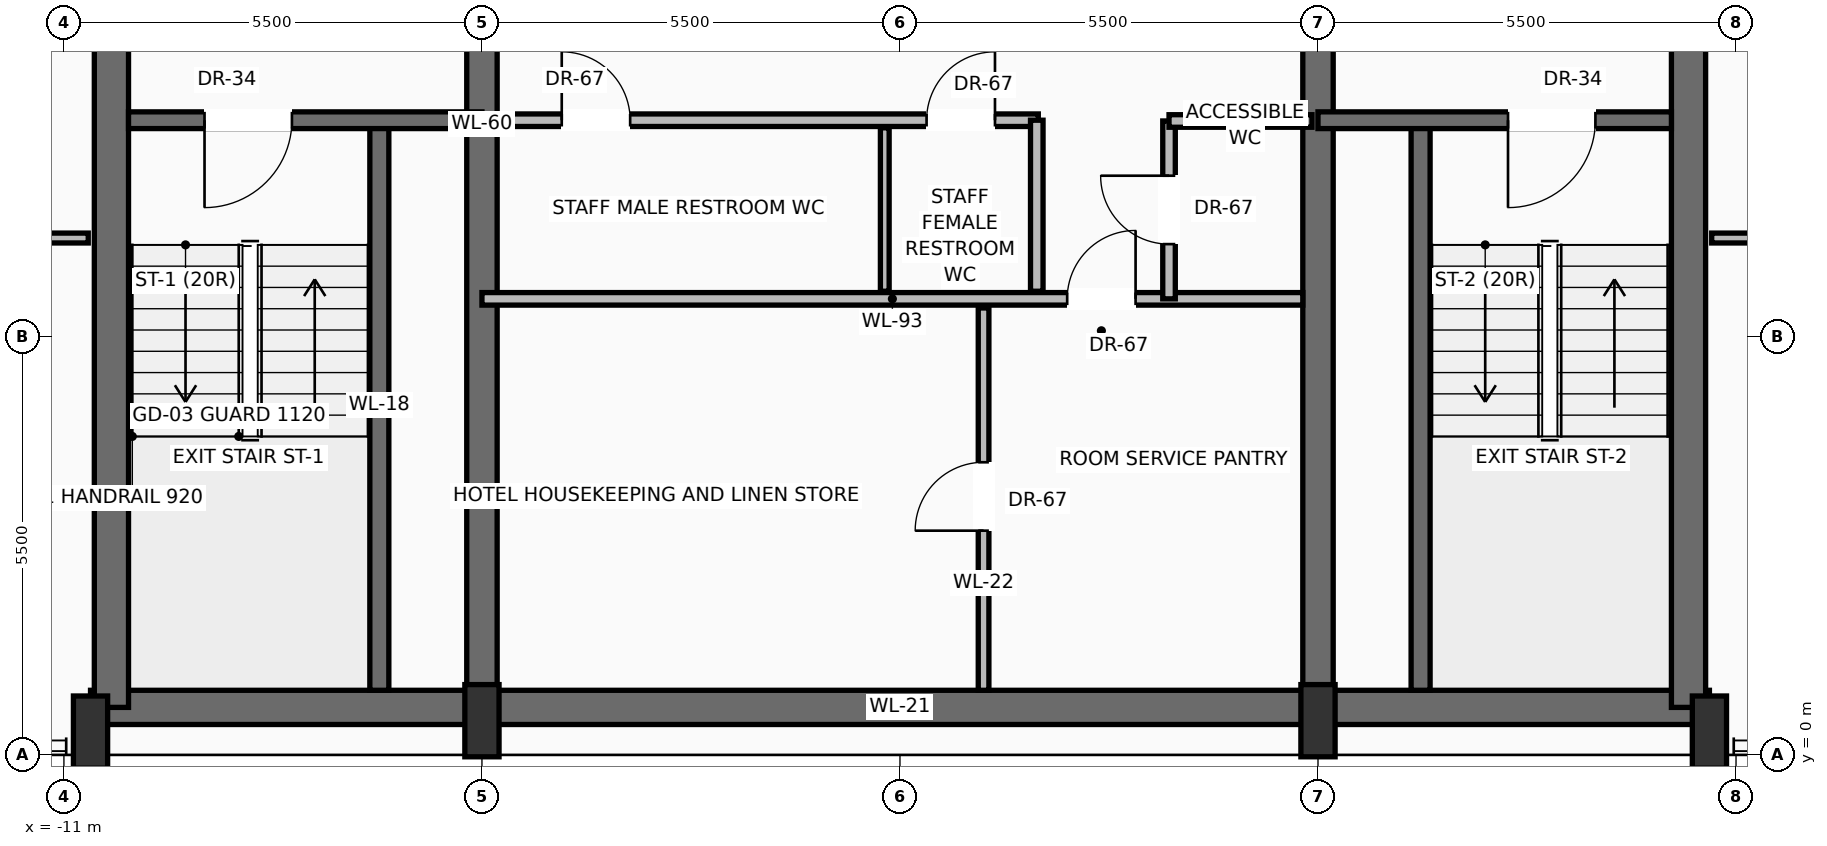
"""IFC4 building model, lengths in metres.
Left out: names, types, materials, properties, quantities, classifications, styles, units other than length and angle.
Written with IfcOpenShell. Run it as: python <this file> out.ifc"""

import sys

from ifc_helpers import new_model, si_unit, direction, frame, frame_2d, origin, origin_2d, place, context, subcontext, project, spatial, rectangle, extrude, source, transform, mapped, element, fill, save


model = new_model("IFC4")
c1 = context("Model", 3, precision=1e-05, world=origin(), true_north=direction((0.0, 1.0)))
c2 = subcontext(c1, "Body", "Model", "MODEL_VIEW")
j1 = project(units=[si_unit("LENGTHUNIT", "METRE"), si_unit("PLANEANGLEUNIT", "RADIAN")], contexts=[c1])
p1 = place(None, origin())
s1 = spatial("IfcSite", under=j1, at=p1, CompositionType="ELEMENT")
p2 = place(p1, origin())
s2 = spatial("IfcBuilding", under=s1, at=p2, CompositionType="ELEMENT")
p3 = place(p2, frame((0.0, 0.0, 293.7)))
s3 = spatial("IfcBuildingStorey", under=s2, at=p3, CompositionType="ELEMENT", Elevation=293.7)
p4 = place(p3, frame((-10.65, 0.625, 0.0), z_axis=(0.0, 0.0, 1.0), x_axis=(1.0, 0.0, 0.0)))
e1 = element("IfcWall", 1, at=p4, inside=s3, PredefinedType="SHEAR", context=c2, shape_type="SweptSolid", body=[
    extrude(rectangle(XDim=21.3, YDim=0.45, at=frame_2d((10.65, 0.0))), origin(), (0.0, 0.0, 1.0), 3.24),
])
for number, where, z_axis, x_axis in (
    (2, (-10.375, 0.625, 0.0), (0.0, 0.0, 1.0), (0.0, 1.0, 0.0)),
    (3, (10.375, 0.625, 0.0), (0.0, 0.0, 1.0), (0.0, 1.0, 0.0)),
):
    element("IfcWall", number, at=place(p3, frame(where, z_axis=z_axis, x_axis=x_axis)), inside=s3, PredefinedType="SHEAR", context=c2, shape_type="SweptSolid", body=[
        extrude(rectangle(XDim=15.35, YDim=0.45, at=frame_2d((7.675, 0.0))), origin(), (0.0, 0.0, 1.0), 3.24),
    ])
p5 = place(p3, frame((-5.5, 0.625, 0.0), z_axis=(0.0, 0.0, 1.0), x_axis=(0.0, 1.0, 0.0)))
e4 = element("IfcWall", 4, at=p5, inside=s3, PredefinedType="SHEAR", context=c2, shape_type="SweptSolid", body=[
    extrude(rectangle(XDim=15.35, YDim=0.4, at=frame_2d((7.675, 0.0))), origin(), (0.0, 0.0, 1.0), 3.24),
])
p6 = place(p5, frame((8.875, 0.0, 0.0)))
e5 = element("IfcOpeningElement", 5, at=p6, cuts=e4, PredefinedType="OPENING", context=c2, shape_type="SweptSolid", body=[
    extrude(rectangle(XDim=1.1, YDim=2.2, at=frame_2d((0.55, 1.1))), frame((0.0, 0.21, 0.0), z_axis=(0.0, -1.0, 0.0), x_axis=(1.0, 0.0, 0.0)), (0.0, 0.0, 1.0), 0.42),
])
p7 = place(p3, frame((5.5, 0.625, 0.0), z_axis=(0.0, 0.0, 1.0), x_axis=(0.0, 1.0, 0.0)))
e6 = element("IfcWall", 6, at=p7, inside=s3, PredefinedType="SHEAR", context=c2, shape_type="SweptSolid", body=[
    extrude(rectangle(XDim=15.35, YDim=0.4, at=frame_2d((7.675, 0.0))), origin(), (0.0, 0.0, 1.0), 3.24),
])
p8 = place(p7, frame((8.875, 0.0, 0.0)))
e7 = element("IfcOpeningElement", 7, at=p8, cuts=e6, PredefinedType="OPENING", context=c2, shape_type="SweptSolid", body=[
    extrude(rectangle(XDim=1.1, YDim=2.2, at=frame_2d((0.55, 1.1))), frame((0.0, 0.21, 0.0), z_axis=(0.0, -1.0, 0.0), x_axis=(1.0, 0.0, 0.0)), (0.0, 0.0, 1.0), 0.42),
])
m1 = source(origin(), c2, "Body", "SweptSolid", [
    extrude(rectangle(XDim=0.45, YDim=0.95, at=origin_2d()), origin(), (0.0, 0.0, 1.0), 3.45),
])
for number, where, z_axis, x_axis in (
    (8, (-10.65, 0.3, 0.0), (0.0, 0.0, 1.0), (1.0, 0.0, 0.0)),
    (9, (-5.5, 0.45, 0.0), (0.0, 0.0, 1.0), (1.0, 0.0, 0.0)),
    (10, (5.5, 0.45, 0.0), (0.0, 0.0, 1.0), (1.0, 0.0, 0.0)),
    (11, (10.65, 0.3, 0.0), (0.0, 0.0, 1.0), (1.0, 0.0, 0.0)),
):
    element("IfcColumn", number, at=place(p3, frame(where, z_axis=z_axis, x_axis=x_axis)), inside=s3, PredefinedType="PILASTER", context=c2, shape_type="MappedRepresentation", body=[
        mapped(m1, transform((0.0, 0.0, 0.0), scale=1.0)),
    ])
p9 = place(p3, frame((-6.85, 0.85, 0.0), z_axis=(0.0, 0.0, 1.0), x_axis=(0.0, 1.0, 0.0)))
e12 = element("IfcWall", 12, at=p9, inside=s3, PredefinedType="SOLIDWALL", context=c2, shape_type="SweptSolid", body=[
    extrude(rectangle(XDim=7.5, YDim=0.25, at=frame_2d((3.75, 0.0))), origin(), (0.0, 0.0, 1.0), 3.24),
])
p10 = place(p3, frame((-5.5, 8.35, 0.0), z_axis=(0.0, 0.0, 1.0), x_axis=(-1.0, 0.0, 0.0)))
e13 = element("IfcWall", 13, at=p10, inside=s3, PredefinedType="SOLIDWALL", context=c2, shape_type="SweptSolid", body=[
    extrude(rectangle(XDim=4.65, YDim=0.22, at=frame_2d((2.325, 0.0))), origin(), (0.0, 0.0, 1.0), 3.24),
])
p11 = place(p10, frame((2.5, 0.0, 0.0)))
e14 = element("IfcOpeningElement", 14, at=p11, cuts=e13, PredefinedType="OPENING", context=c2, shape_type="SweptSolid", body=[
    extrude(rectangle(XDim=1.15, YDim=2.2, at=frame_2d((0.575, 1.1))), frame((0.0, 0.12, 0.0), z_axis=(0.0, -1.0, 0.0), x_axis=(1.0, 0.0, 0.0)), (0.0, 0.0, 1.0), 0.24),
])
p12 = place(p3, frame((6.85, 0.85, 0.0), z_axis=(0.0, 0.0, 1.0), x_axis=(0.0, 1.0, 0.0)))
e15 = element("IfcWall", 15, at=p12, inside=s3, PredefinedType="SOLIDWALL", context=c2, shape_type="SweptSolid", body=[
    extrude(rectangle(XDim=7.5, YDim=0.25, at=frame_2d((3.75, 0.0))), origin(), (0.0, 0.0, 1.0), 3.24),
])
p13 = place(p3, frame((10.15, 8.35, 0.0), z_axis=(0.0, 0.0, 1.0), x_axis=(-1.0, 0.0, 0.0)))
e16 = element("IfcWall", 16, at=p13, inside=s3, PredefinedType="SOLIDWALL", context=c2, shape_type="SweptSolid", body=[
    extrude(rectangle(XDim=4.65, YDim=0.22, at=frame_2d((2.325, 0.0))), origin(), (0.0, 0.0, 1.0), 3.24),
])
p14 = place(p13, frame((1.0, 0.0, 0.0)))
e17 = element("IfcOpeningElement", 17, at=p14, cuts=e16, PredefinedType="OPENING", context=c2, shape_type="SweptSolid", body=[
    extrude(rectangle(XDim=1.15, YDim=2.2, at=frame_2d((0.575, 1.1))), frame((0.0, 0.12, 0.0), z_axis=(0.0, -1.0, 0.0), x_axis=(1.0, 0.0, 0.0)), (0.0, 0.0, 1.0), 0.24),
])
p15 = place(p3, frame((-5.5, 6.0, 0.0), z_axis=(0.0, 0.0, 1.0), x_axis=(1.0, 0.0, 0.0)))
e18 = element("IfcWall", 18, at=p15, inside=s3, PredefinedType="PARTITIONING", context=c2, shape_type="SweptSolid", body=[
    extrude(rectangle(XDim=10.8, YDim=0.165, at=frame_2d((5.4, 0.0))), origin(), (0.0, 0.0, 1.0), 3.232),
])
p16 = place(p15, frame((7.7, 0.0, 0.0)))
e19 = element("IfcOpeningElement", 19, at=p16, cuts=e18, PredefinedType="OPENING", context=c2, shape_type="SweptSolid", body=[
    extrude(rectangle(XDim=0.9, YDim=2.1, at=frame_2d((0.45, 1.05))), frame((0.0, 0.093, 0.0), z_axis=(0.0, -1.0, 0.0), x_axis=(1.0, 0.0, 0.0)), (0.0, 0.0, 1.0), 0.185),
])
p17 = place(p3, frame((1.1, 0.85, 0.0), z_axis=(0.0, 0.0, 1.0), x_axis=(0.0, 1.0, 0.0)))
e20 = element("IfcWall", 20, at=p17, inside=s3, PredefinedType="PARTITIONING", context=c2, shape_type="SweptSolid", body=[
    extrude(rectangle(XDim=5.03, YDim=0.14, at=frame_2d((2.515, 0.0))), origin(), (0.0, 0.0, 1.0), 3.232),
])
p18 = place(p17, frame((2.1, 0.0, 0.0)))
e21 = element("IfcOpeningElement", 21, at=p18, cuts=e20, PredefinedType="OPENING", context=c2, shape_type="SweptSolid", body=[
    extrude(rectangle(XDim=0.9, YDim=2.1, at=frame_2d((0.45, 1.05))), frame((0.0, 0.08, 0.0), z_axis=(0.0, -1.0, 0.0), x_axis=(1.0, 0.0, 0.0)), (0.0, 0.0, 1.0), 0.16),
])
p19 = place(p3, frame((3.54, 6.0, 0.0), z_axis=(0.0, 0.0, 1.0), x_axis=(0.0, 1.0, 0.0)))
e22 = element("IfcWall", 22, at=p19, inside=s3, PredefinedType="PARTITIONING", context=c2, shape_type="SweptSolid", body=[
    extrude(rectangle(XDim=2.34, YDim=0.165, at=frame_2d((1.17, 0.0))), origin(), (0.0, 0.0, 1.0), 3.232),
])
p20 = place(p19, frame((0.72, 0.0, 0.0)))
e23 = element("IfcOpeningElement", 23, at=p20, cuts=e22, PredefinedType="OPENING", context=c2, shape_type="SweptSolid", body=[
    extrude(rectangle(XDim=0.9, YDim=2.1, at=frame_2d((0.45, 1.05))), frame((0.0, 0.093, 0.0), z_axis=(0.0, -1.0, 0.0), x_axis=(1.0, 0.0, 0.0)), (0.0, 0.0, 1.0), 0.185),
])
p21 = place(p3, frame((3.54, 8.34, 0.0), z_axis=(0.0, 0.0, 1.0), x_axis=(1.0, 0.0, 0.0)))
e24 = element("IfcWall", 24, at=p21, inside=s3, PredefinedType="PARTITIONING", context=c2, shape_type="SweptSolid", body=[
    extrude(rectangle(XDim=1.88, YDim=0.165, at=frame_2d((0.94, 0.0))), origin(), (0.0, 0.0, 1.0), 3.232),
])
p22 = place(p3, frame((-5.3, 8.35, 0.0), z_axis=(0.0, 0.0, 1.0), x_axis=(1.0, 0.0, 0.0)))
e25 = element("IfcWall", 25, at=p22, inside=s3, PredefinedType="PARTITIONING", context=c2, shape_type="SweptSolid", body=[
    extrude(rectangle(XDim=7.12, YDim=0.165, at=frame_2d((3.56, 0.0))), origin(), (0.0, 0.0, 1.0), 3.232),
])
p23 = place(p22, frame((0.85, 0.0, 0.0)))
e26 = element("IfcOpeningElement", 26, at=p23, cuts=e25, PredefinedType="OPENING", context=c2, shape_type="SweptSolid", body=[
    extrude(rectangle(XDim=0.9, YDim=2.1, at=frame_2d((0.45, 1.05))), frame((0.0, 0.093, 0.0), z_axis=(0.0, -1.0, 0.0), x_axis=(1.0, 0.0, 0.0)), (0.0, 0.0, 1.0), 0.185),
])
p24 = place(p22, frame((5.65, 0.0, 0.0)))
e27 = element("IfcOpeningElement", 27, at=p24, cuts=e25, PredefinedType="OPENING", context=c2, shape_type="SweptSolid", body=[
    extrude(rectangle(XDim=0.9, YDim=2.1, at=frame_2d((0.45, 1.05))), frame((0.0, 0.093, 0.0), z_axis=(0.0, -1.0, 0.0), x_axis=(1.0, 0.0, 0.0)), (0.0, 0.0, 1.0), 0.185),
])
p25 = place(p3, frame((1.8, 6.1, 0.0), z_axis=(0.0, 0.0, 1.0), x_axis=(0.0, 1.0, 0.0)))
e28 = element("IfcWall", 28, at=p25, inside=s3, PredefinedType="PARTITIONING", context=c2, shape_type="SweptSolid", body=[
    extrude(rectangle(XDim=2.25, YDim=0.165, at=frame_2d((1.125, 0.0))), origin(), (0.0, 0.0, 1.0), 3.232),
])
p26 = place(p3, frame((-0.2, 6.1, 0.0), z_axis=(0.0, 0.0, 1.0), x_axis=(0.0, 1.0, 0.0)))
e29 = element("IfcWall", 29, at=p26, inside=s3, PredefinedType="PARTITIONING", context=c2, shape_type="SweptSolid", body=[
    extrude(rectangle(XDim=2.15, YDim=0.115, at=frame_2d((1.075, 0.0))), origin(), (0.0, 0.0, 1.0), 3.232),
])
p27 = place(p3, frame((-22.141, 6.8, 0.0), z_axis=(0.0, 0.0, 1.0), x_axis=(1.0, 0.0, 0.0)))
e30 = element("IfcWall", 30, at=p27, inside=s3, PredefinedType="PARTITIONING", context=c2, shape_type="SweptSolid", body=[
    extrude(rectangle(XDim=11.461, YDim=0.13, at=frame_2d((5.731, 0.0))), origin(), (0.0, 0.0, 1.0), 3.232),
])
p28 = place(p27, frame((4.717, 0.0, 0.0)))
e31 = element("IfcOpeningElement", 31, at=p28, cuts=e30, PredefinedType="OPENING", context=c2, shape_type="SweptSolid", body=[
    extrude(rectangle(XDim=0.95, YDim=2.2, at=frame_2d((0.475, 1.1))), frame((0.0, 0.075, 0.0), z_axis=(0.0, -1.0, 0.0), x_axis=(1.0, 0.0, 0.0)), (0.0, 0.0, 1.0), 0.15),
])
p29 = place(p3, frame((10.68, 6.8, 0.0), z_axis=(0.0, 0.0, 1.0), x_axis=(1.0, 0.0, 0.0)))
e32 = element("IfcWall", 32, at=p29, inside=s3, PredefinedType="PARTITIONING", context=c2, shape_type="SweptSolid", body=[
    extrude(rectangle(XDim=11.43, YDim=0.13, at=frame_2d((5.715, 0.0))), origin(), (0.0, 0.0, 1.0), 3.232),
])
p30 = place(p29, frame((4.703, 0.0, 0.0)))
e33 = element("IfcOpeningElement", 33, at=p30, cuts=e32, PredefinedType="OPENING", context=c2, shape_type="SweptSolid", body=[
    extrude(rectangle(XDim=0.95, YDim=2.2, at=frame_2d((0.475, 1.1))), frame((0.0, 0.075, 0.0), z_axis=(0.0, -1.0, 0.0), x_axis=(1.0, 0.0, 0.0)), (0.0, 0.0, 1.0), 0.15),
])
m2 = source(origin(), c2, "Body", "SweptSolid", [
    extrude(rectangle(XDim=1.15, YDim=2.2, at=frame_2d((0.575, 1.1))), frame((0.0, 0.025, 0.0), z_axis=(0.0, -1.0, 0.0), x_axis=(1.0, 0.0, 0.0)), (0.0, 0.0, 1.0), 0.05),
])
p31 = place(p11, origin())
e34 = element("IfcDoor", 34, at=p31, inside=s3, OperationType="SINGLE_SWING_RIGHT", PredefinedType="DOOR", context=c2, shape_type="MappedRepresentation", body=[
    mapped(m2, transform((0.0, 0.0, 0.0), scale=1.0)),
])
fill(e14, e34)
p32 = place(p14, origin())
e35 = element("IfcDoor", 35, at=p32, inside=s3, OperationType="SINGLE_SWING_RIGHT", PredefinedType="DOOR", context=c2, shape_type="MappedRepresentation", body=[
    mapped(m2, transform((0.0, 0.0, 0.0), scale=1.0)),
])
fill(e17, e35)
m3 = source(origin(), c2, "Body", "SweptSolid", [
    extrude(rectangle(XDim=0.9, YDim=2.1, at=frame_2d((0.45, 1.05))), frame((0.0, 0.025, 0.0), z_axis=(0.0, -1.0, 0.0), x_axis=(1.0, 0.0, 0.0)), (0.0, 0.0, 1.0), 0.05),
])
p33 = place(p16, origin())
e36 = element("IfcDoor", 36, at=p33, inside=s3, OperationType="SINGLE_SWING_RIGHT", PredefinedType="DOOR", context=c2, shape_type="MappedRepresentation", body=[
    mapped(m3, transform((0.0, 0.0, 0.0), scale=1.0)),
])
fill(e19, e36)
p34 = place(p18, origin())
e37 = element("IfcDoor", 37, at=p34, inside=s3, OperationType="SINGLE_SWING_LEFT", PredefinedType="DOOR", context=c2, shape_type="MappedRepresentation", body=[
    mapped(m3, transform((0.0, 0.0, 0.0), scale=1.0)),
])
fill(e21, e37)
p35 = place(p20, origin())
e38 = element("IfcDoor", 38, at=p35, inside=s3, OperationType="SINGLE_SWING_RIGHT", PredefinedType="DOOR", context=c2, shape_type="MappedRepresentation", body=[
    mapped(m3, transform((0.0, 0.0, 0.0), scale=1.0)),
])
fill(e23, e38)
p36 = place(p23, origin())
e39 = element("IfcDoor", 39, at=p36, inside=s3, OperationType="SINGLE_SWING_LEFT", PredefinedType="DOOR", context=c2, shape_type="MappedRepresentation", body=[
    mapped(m3, transform((0.0, 0.0, 0.0), scale=1.0)),
])
fill(e26, e39)
p37 = place(p24, origin())
e40 = element("IfcDoor", 40, at=p37, inside=s3, OperationType="SINGLE_SWING_RIGHT", PredefinedType="DOOR", context=c2, shape_type="MappedRepresentation", body=[
    mapped(m3, transform((0.0, 0.0, 0.0), scale=1.0)),
])
fill(e27, e40)
save(model, sys.argv[1])
